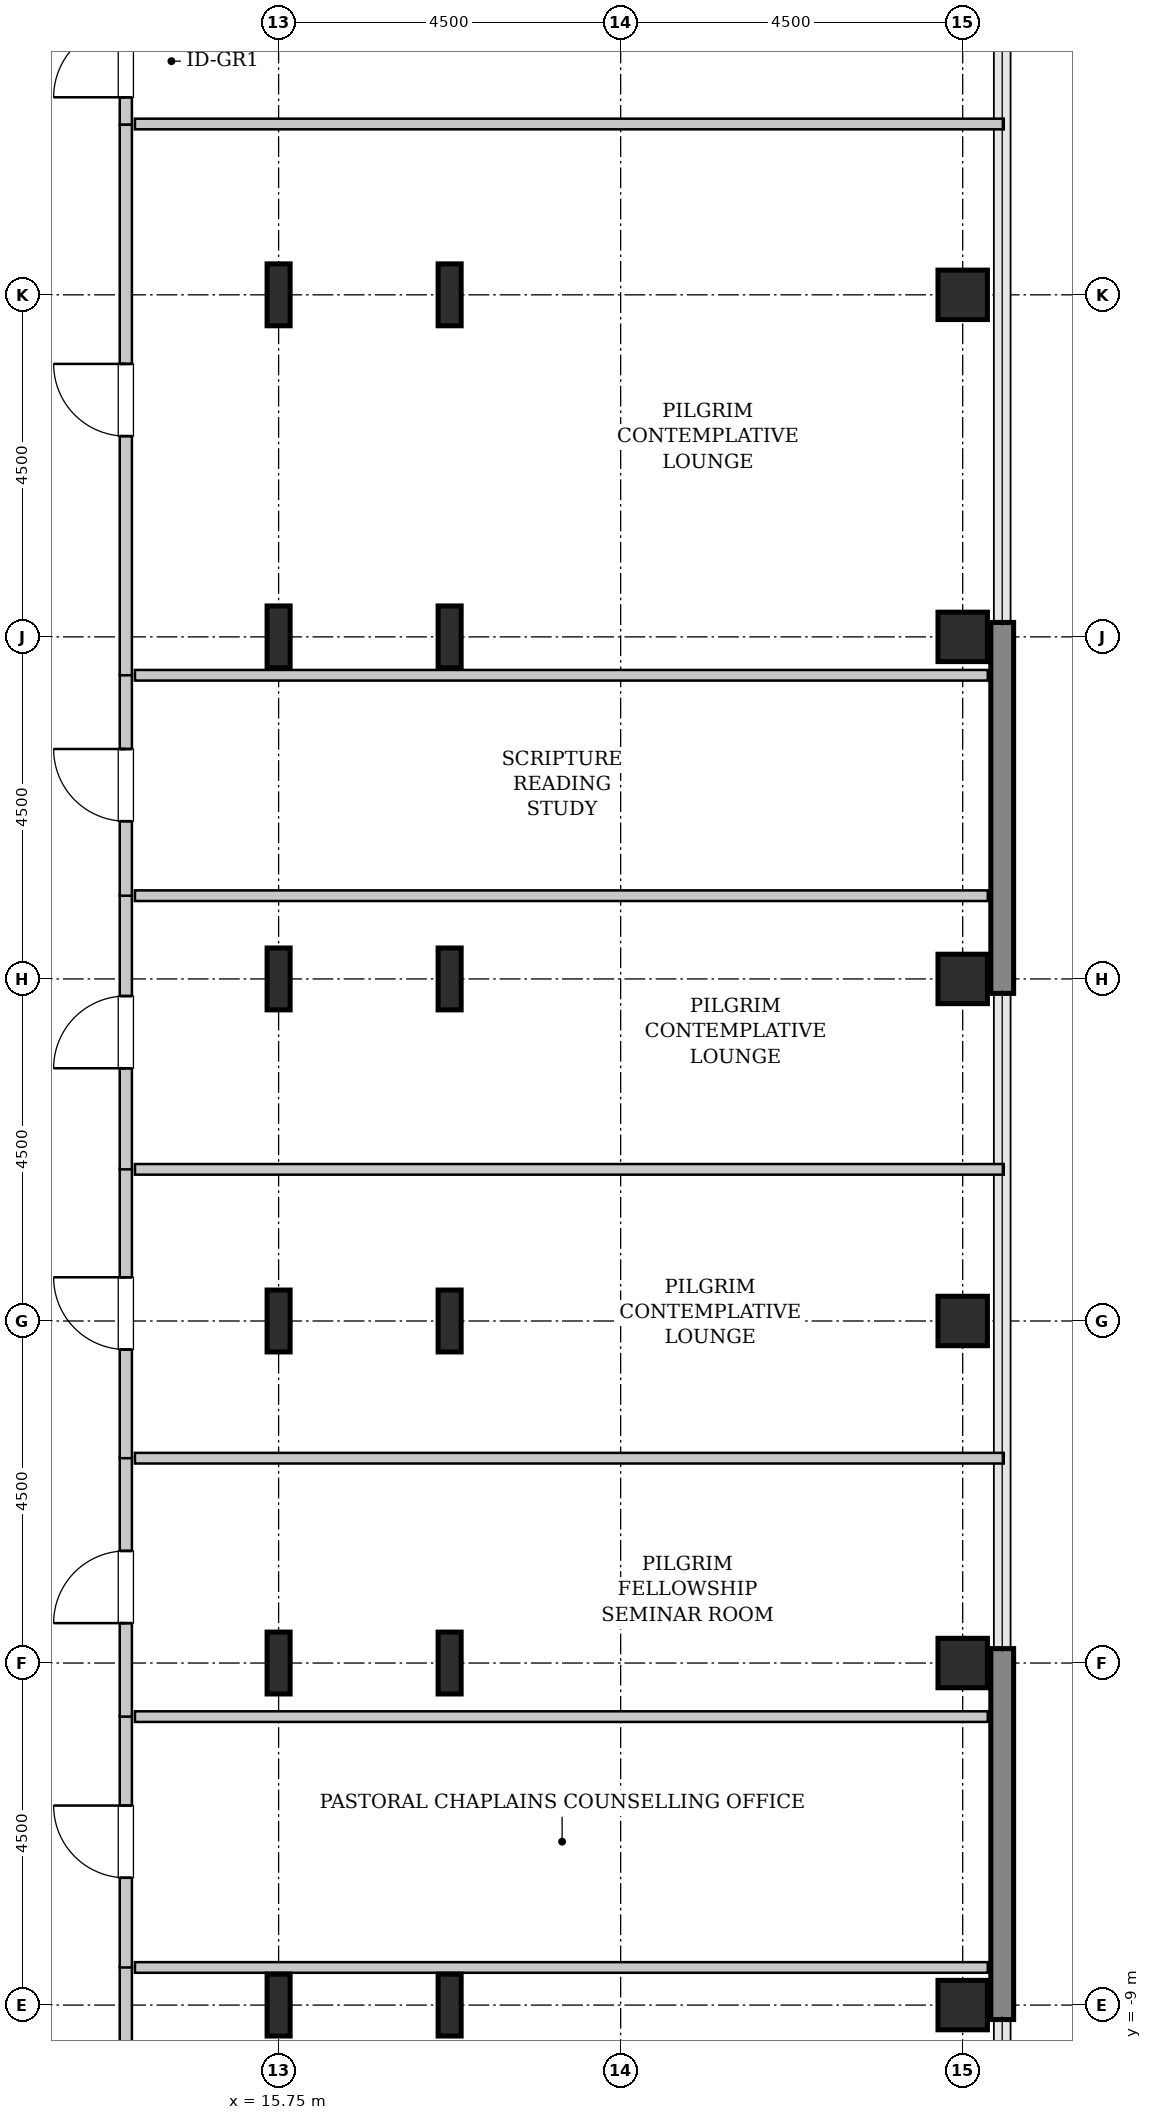
"""IFC4 building model, lengths in metres.
Left out: names, types, materials, properties, quantities, classifications, styles, units other than length and angle.
Written with IfcOpenShell. Run it as: python <this file> out.ifc"""

import sys

from ifc_helpers import new_model, si_unit, direction, frame, frame_2d, origin, origin_2d, place, context, subcontext, project, spatial, rectangle, hollow_rectangle, i_section, extrude, source, transform, mapped, element, fill, save


model = new_model("IFC4")
c1 = context("Model", 3, precision=1e-05, world=origin(), true_north=direction((0.0, 1.0)))
c2 = subcontext(c1, "Body", "Model", "MODEL_VIEW")
j1 = project(units=[si_unit("LENGTHUNIT", "METRE"), si_unit("PLANEANGLEUNIT", "RADIAN")], contexts=[c1])
p1 = place(None, origin())
s1 = spatial("IfcSite", under=j1, at=p1, CompositionType="ELEMENT")
p2 = place(p1, origin())
s2 = spatial("IfcBuilding", under=s1, at=p2, CompositionType="ELEMENT")
p3 = place(p2, frame((0.0, 0.0, 252.2)))
s3 = spatial("IfcBuildingStorey", under=s2, at=p3, CompositionType="ELEMENT", Elevation=252.2)
m1 = source(origin(), c2, "Body", "SweptSolid", [
    extrude(i_section(OverallWidth=0.303, OverallDepth=0.814, WebThickness=0.021, FlangeThickness=0.04, FilletRadius=0.03, at=origin_2d()), origin(), (0.0, 0.0, 1.0), 3.8),
])
for number, where, z_axis, x_axis in (
    (1, (15.75, -9.0, 0.0), (0.0, 0.0, 1.0), (1.0, 0.0, 0.0)),
    (2, (15.75, -4.5, 0.0), (0.0, 0.0, 1.0), (1.0, 0.0, 0.0)),
    (3, (15.75, 0.0, 0.0), (0.0, 0.0, 1.0), (1.0, 0.0, 0.0)),
    (4, (15.75, 4.5, 0.0), (0.0, 0.0, 1.0), (1.0, 0.0, 0.0)),
    (5, (15.75, 9.0, 0.0), (0.0, 0.0, 1.0), (1.0, 0.0, 0.0)),
    (6, (15.75, 13.5, 0.0), (0.0, 0.0, 1.0), (1.0, 0.0, 0.0)),
    (7, (18.0, -9.0, 0.0), (0.0, 0.0, 1.0), (1.0, 0.0, 0.0)),
    (8, (18.0, -4.5, 0.0), (0.0, 0.0, 1.0), (1.0, 0.0, 0.0)),
    (9, (18.0, 0.0, 0.0), (0.0, 0.0, 1.0), (1.0, 0.0, 0.0)),
    (10, (18.0, 4.5, 0.0), (0.0, 0.0, 1.0), (1.0, 0.0, 0.0)),
    (11, (18.0, 9.0, 0.0), (0.0, 0.0, 1.0), (1.0, 0.0, 0.0)),
    (12, (18.0, 13.5, 0.0), (0.0, 0.0, 1.0), (1.0, 0.0, 0.0)),
):
    element("IfcColumn", number, at=place(p3, frame(where, z_axis=z_axis, x_axis=x_axis)), inside=s3, PredefinedType="COLUMN", context=c2, shape_type="MappedRepresentation", body=[
        mapped(m1, transform((0.0, 0.0, 0.0), x_axis=(1.0, 0.0, 0.0), y_axis=(0.0, 1.0, 0.0), z_axis=(0.0, 0.0, 1.0), scale=1.0)),
    ])
m2 = source(origin(), c2, "Body", "SweptSolid", [
    extrude(hollow_rectangle(XDim=0.65, YDim=0.65, WallThickness=0.032, InnerFilletRadius=0.032, OuterFilletRadius=0.064, at=origin_2d()), origin(), (0.0, 0.0, 1.0), 3.8),
])
for number, where, z_axis, x_axis in (
    (13, (24.75, -9.0, 0.0), (0.0, 0.0, 1.0), (1.0, 0.0, 0.0)),
    (14, (24.75, -4.5, 0.0), (0.0, 0.0, 1.0), (1.0, 0.0, 0.0)),
    (15, (24.75, 0.0, 0.0), (0.0, 0.0, 1.0), (1.0, 0.0, 0.0)),
    (16, (24.75, 4.5, 0.0), (0.0, 0.0, 1.0), (1.0, 0.0, 0.0)),
    (17, (24.75, 9.0, 0.0), (0.0, 0.0, 1.0), (1.0, 0.0, 0.0)),
    (18, (24.75, 13.5, 0.0), (0.0, 0.0, 1.0), (1.0, 0.0, 0.0)),
):
    element("IfcColumn", number, at=place(p3, frame(where, z_axis=z_axis, x_axis=x_axis)), inside=s3, PredefinedType="COLUMN", context=c2, shape_type="MappedRepresentation", body=[
        mapped(m2, transform((0.0, 0.0, 0.0), x_axis=(1.0, 0.0, 0.0), y_axis=(0.0, 1.0, 0.0), z_axis=(0.0, 0.0, 1.0), scale=1.0)),
    ])
m3 = source(origin(), c2, "Body", "SweptSolid", [
    extrude(rectangle(XDim=4.88, YDim=0.3, at=frame_2d((2.44, 0.0))), origin(), (0.0, 0.0, 1.0), 3.55),
])
for number, where, z_axis, x_axis in (
    (19, (25.27, -9.19, 0.0), (0.0, 0.0, 1.0), (0.0, 1.0, 0.0)),
    (20, (25.27, 4.31, 0.0), (0.0, 0.0, 1.0), (0.0, 1.0, 0.0)),
):
    element("IfcWall", number, at=place(p3, frame(where, z_axis=z_axis, x_axis=x_axis)), inside=s3, PredefinedType="SHEAR", context=c2, shape_type="MappedRepresentation", body=[
        mapped(m3, transform((0.0, 0.0, 0.0), x_axis=(1.0, 0.0, 0.0), y_axis=(0.0, 1.0, 0.0), z_axis=(0.0, 0.0, 1.0), scale=1.0)),
    ])
m4 = source(origin(), c2, "Body", "SweptSolid", [
    extrude(rectangle(XDim=7.242, YDim=0.16, at=frame_2d((3.621, 0.0))), origin(), (0.0, 0.0, 1.0), 3.535),
])
p4 = place(p3, frame((13.74, -15.738, 0.0), z_axis=(0.0, 0.0, 1.0), x_axis=(0.0, 1.0, 0.0)))
e21 = element("IfcWall", 21, at=p4, inside=s3, PredefinedType="PARTITIONING", context=c2, shape_type="MappedRepresentation", body=[
    mapped(m4, transform((0.0, 0.0, 0.0), x_axis=(1.0, 0.0, 0.0), y_axis=(0.0, 1.0, 0.0), z_axis=(0.0, 0.0, 1.0), scale=1.0)),
])
p5 = place(p4, frame((3.146, 0.0, 0.0)))
e22 = element("IfcOpeningElement", 22, at=p5, cuts=e21, PredefinedType="OPENING", context=c2, shape_type="SweptSolid", body=[
    extrude(rectangle(XDim=0.95, YDim=2.1, at=frame_2d((0.475, 1.05))), frame((0.0, 0.09, 0.0), z_axis=(0.0, -1.0, 0.0), x_axis=(1.0, 0.0, 0.0)), (0.0, 0.0, 1.0), 0.18),
])
m5 = source(origin(), c2, "Body", "SweptSolid", [
    extrude(rectangle(XDim=11.22, YDim=0.14, at=frame_2d((5.61, 0.0))), origin(), (0.0, 0.0, 1.0), 2.925),
])
p6 = place(p3, frame((13.86, -8.505, 0.0), z_axis=(0.0, 0.0, 1.0), x_axis=(1.0, 0.0, 0.0)))
e23 = element("IfcWall", 23, at=p6, inside=s3, PredefinedType="PARTITIONING", context=c2, shape_type="MappedRepresentation", body=[
    mapped(m5, transform((0.0, 0.0, 0.0), x_axis=(1.0, 0.0, 0.0), y_axis=(0.0, 1.0, 0.0), z_axis=(0.0, 0.0, 1.0), scale=1.0)),
])
m6 = source(origin(), c2, "Body", "SweptSolid", [
    extrude(rectangle(XDim=3.31, YDim=0.16, at=frame_2d((1.655, 0.0))), origin(), (0.0, 0.0, 1.0), 3.535),
])
p7 = place(p3, frame((13.74, -8.505, 0.0), z_axis=(0.0, 0.0, 1.0), x_axis=(0.0, 1.0, 0.0)))
e24 = element("IfcWall", 24, at=p7, inside=s3, PredefinedType="PARTITIONING", context=c2, shape_type="MappedRepresentation", body=[
    mapped(m6, transform((0.0, 0.0, 0.0), x_axis=(1.0, 0.0, 0.0), y_axis=(0.0, 1.0, 0.0), z_axis=(0.0, 0.0, 1.0), scale=1.0)),
])
p8 = place(p7, frame((1.18, 0.0, 0.0)))
e25 = element("IfcOpeningElement", 25, at=p8, cuts=e24, PredefinedType="OPENING", context=c2, shape_type="SweptSolid", body=[
    extrude(rectangle(XDim=0.95, YDim=2.1, at=frame_2d((0.475, 1.05))), frame((0.0, 0.09, 0.0), z_axis=(0.0, -1.0, 0.0), x_axis=(1.0, 0.0, 0.0)), (0.0, 0.0, 1.0), 0.18),
])
m7 = source(origin(), c2, "Body", "SweptSolid", [
    extrude(rectangle(XDim=11.22, YDim=0.14, at=frame_2d((5.61, 0.0))), origin(), (0.0, 0.0, 1.0), 3.535),
])
p9 = place(p3, frame((13.86, -5.205, 0.0), z_axis=(0.0, 0.0, 1.0), x_axis=(1.0, 0.0, 0.0)))
e26 = element("IfcWall", 26, at=p9, inside=s3, PredefinedType="PARTITIONING", context=c2, shape_type="MappedRepresentation", body=[
    mapped(m7, transform((0.0, 0.0, 0.0), x_axis=(1.0, 0.0, 0.0), y_axis=(0.0, 1.0, 0.0), z_axis=(0.0, 0.0, 1.0), scale=1.0)),
])
m8 = source(origin(), c2, "Body", "SweptSolid", [
    extrude(rectangle(XDim=3.41, YDim=0.16, at=frame_2d((1.705, 0.0))), origin(), (0.0, 0.0, 1.0), 3.535),
])
p10 = place(p3, frame((13.74, -5.205, 0.0), z_axis=(0.0, 0.0, 1.0), x_axis=(0.0, 1.0, 0.0)))
e27 = element("IfcWall", 27, at=p10, inside=s3, PredefinedType="PARTITIONING", context=c2, shape_type="MappedRepresentation", body=[
    mapped(m8, transform((0.0, 0.0, 0.0), x_axis=(1.0, 0.0, 0.0), y_axis=(0.0, 1.0, 0.0), z_axis=(0.0, 0.0, 1.0), scale=1.0)),
])
p11 = place(p10, frame((1.23, 0.0, 0.0)))
e28 = element("IfcOpeningElement", 28, at=p11, cuts=e27, PredefinedType="OPENING", context=c2, shape_type="SweptSolid", body=[
    extrude(rectangle(XDim=0.95, YDim=2.1, at=frame_2d((0.475, 1.05))), frame((0.0, 0.09, 0.0), z_axis=(0.0, -1.0, 0.0), x_axis=(1.0, 0.0, 0.0)), (0.0, 0.0, 1.0), 0.18),
])
m9 = source(origin(), c2, "Body", "SweptSolid", [
    extrude(rectangle(XDim=11.43, YDim=0.14, at=frame_2d((5.715, 0.0))), origin(), (0.0, 0.0, 1.0), 3.535),
])
p12 = place(p3, frame((13.86, -1.805, 0.0), z_axis=(0.0, 0.0, 1.0), x_axis=(1.0, 0.0, 0.0)))
e29 = element("IfcWall", 29, at=p12, inside=s3, PredefinedType="PARTITIONING", context=c2, shape_type="MappedRepresentation", body=[
    mapped(m9, transform((0.0, 0.0, 0.0), x_axis=(1.0, 0.0, 0.0), y_axis=(0.0, 1.0, 0.0), z_axis=(0.0, 0.0, 1.0), scale=1.0)),
])
m10 = source(origin(), c2, "Body", "SweptSolid", [
    extrude(rectangle(XDim=3.81, YDim=0.16, at=frame_2d((1.905, 0.0))), origin(), (0.0, 0.0, 1.0), 3.535),
])
p13 = place(p3, frame((13.74, -1.805, 0.0), z_axis=(0.0, 0.0, 1.0), x_axis=(0.0, 1.0, 0.0)))
e30 = element("IfcWall", 30, at=p13, inside=s3, PredefinedType="PARTITIONING", context=c2, shape_type="MappedRepresentation", body=[
    mapped(m10, transform((0.0, 0.0, 0.0), x_axis=(1.0, 0.0, 0.0), y_axis=(0.0, 1.0, 0.0), z_axis=(0.0, 0.0, 1.0), scale=1.0)),
])
p14 = place(p13, frame((1.43, 0.0, 0.0)))
e31 = element("IfcOpeningElement", 31, at=p14, cuts=e30, PredefinedType="OPENING", context=c2, shape_type="SweptSolid", body=[
    extrude(rectangle(XDim=0.95, YDim=2.1, at=frame_2d((0.475, 1.05))), frame((0.0, 0.09, 0.0), z_axis=(0.0, -1.0, 0.0), x_axis=(1.0, 0.0, 0.0)), (0.0, 0.0, 1.0), 0.18),
])
p15 = place(p3, frame((13.86, 1.995, 0.0), z_axis=(0.0, 0.0, 1.0), x_axis=(1.0, 0.0, 0.0)))
e32 = element("IfcWall", 32, at=p15, inside=s3, PredefinedType="PARTITIONING", context=c2, shape_type="MappedRepresentation", body=[
    mapped(m9, transform((0.0, 0.0, 0.0), x_axis=(1.0, 0.0, 0.0), y_axis=(0.0, 1.0, 0.0), z_axis=(0.0, 0.0, 1.0), scale=1.0)),
])
m11 = source(origin(), c2, "Body", "SweptSolid", [
    extrude(rectangle(XDim=3.61, YDim=0.16, at=frame_2d((1.805, 0.0))), origin(), (0.0, 0.0, 1.0), 3.535),
])
p16 = place(p3, frame((13.74, 1.995, 0.0), z_axis=(0.0, 0.0, 1.0), x_axis=(0.0, 1.0, 0.0)))
e33 = element("IfcWall", 33, at=p16, inside=s3, PredefinedType="PARTITIONING", context=c2, shape_type="MappedRepresentation", body=[
    mapped(m11, transform((0.0, 0.0, 0.0), x_axis=(1.0, 0.0, 0.0), y_axis=(0.0, 1.0, 0.0), z_axis=(0.0, 0.0, 1.0), scale=1.0)),
])
p17 = place(p16, frame((1.33, 0.0, 0.0)))
e34 = element("IfcOpeningElement", 34, at=p17, cuts=e33, PredefinedType="OPENING", context=c2, shape_type="SweptSolid", body=[
    extrude(rectangle(XDim=0.95, YDim=2.1, at=frame_2d((0.475, 1.05))), frame((0.0, 0.09, 0.0), z_axis=(0.0, -1.0, 0.0), x_axis=(1.0, 0.0, 0.0)), (0.0, 0.0, 1.0), 0.18),
])
p18 = place(p3, frame((13.86, 5.595, 0.0), z_axis=(0.0, 0.0, 1.0), x_axis=(1.0, 0.0, 0.0)))
e35 = element("IfcWall", 35, at=p18, inside=s3, PredefinedType="PARTITIONING", context=c2, shape_type="MappedRepresentation", body=[
    mapped(m7, transform((0.0, 0.0, 0.0), x_axis=(1.0, 0.0, 0.0), y_axis=(0.0, 1.0, 0.0), z_axis=(0.0, 0.0, 1.0), scale=1.0)),
])
m12 = source(origin(), c2, "Body", "SweptSolid", [
    extrude(rectangle(XDim=2.91, YDim=0.16, at=frame_2d((1.455, 0.0))), origin(), (0.0, 0.0, 1.0), 3.535),
])
p19 = place(p3, frame((13.74, 5.595, 0.0), z_axis=(0.0, 0.0, 1.0), x_axis=(0.0, 1.0, 0.0)))
e36 = element("IfcWall", 36, at=p19, inside=s3, PredefinedType="PARTITIONING", context=c2, shape_type="MappedRepresentation", body=[
    mapped(m12, transform((0.0, 0.0, 0.0), x_axis=(1.0, 0.0, 0.0), y_axis=(0.0, 1.0, 0.0), z_axis=(0.0, 0.0, 1.0), scale=1.0)),
])
p20 = place(p19, frame((0.98, 0.0, 0.0)))
e37 = element("IfcOpeningElement", 37, at=p20, cuts=e36, PredefinedType="OPENING", context=c2, shape_type="SweptSolid", body=[
    extrude(rectangle(XDim=0.95, YDim=2.1, at=frame_2d((0.475, 1.05))), frame((0.0, 0.09, 0.0), z_axis=(0.0, -1.0, 0.0), x_axis=(1.0, 0.0, 0.0)), (0.0, 0.0, 1.0), 0.18),
])
p21 = place(p3, frame((13.86, 8.495, 0.0), z_axis=(0.0, 0.0, 1.0), x_axis=(1.0, 0.0, 0.0)))
e38 = element("IfcWall", 38, at=p21, inside=s3, PredefinedType="PARTITIONING", context=c2, shape_type="MappedRepresentation", body=[
    mapped(m5, transform((0.0, 0.0, 0.0), x_axis=(1.0, 0.0, 0.0), y_axis=(0.0, 1.0, 0.0), z_axis=(0.0, 0.0, 1.0), scale=1.0)),
])
m13 = source(origin(), c2, "Body", "SweptSolid", [
    extrude(rectangle(XDim=7.302, YDim=0.16, at=frame_2d((3.651, 0.0))), origin(), (0.0, 0.0, 1.0), 3.535),
])
p22 = place(p3, frame((13.74, 15.738, 0.0), z_axis=(0.0, 0.0, 1.0), x_axis=(0.0, 1.0, 0.0)))
e39 = element("IfcWall", 39, at=p22, inside=s3, PredefinedType="PARTITIONING", context=c2, shape_type="MappedRepresentation", body=[
    mapped(m13, transform((0.0, 0.0, 0.0), x_axis=(1.0, 0.0, 0.0), y_axis=(0.0, 1.0, 0.0), z_axis=(0.0, 0.0, 1.0), scale=1.0)),
])
p23 = place(p22, frame((0.361, 0.0, 0.0)))
e40 = element("IfcOpeningElement", 40, at=p23, cuts=e39, PredefinedType="OPENING", context=c2, shape_type="SweptSolid", body=[
    extrude(rectangle(XDim=0.95, YDim=2.1, at=frame_2d((0.475, 1.05))), frame((0.0, 0.09, 0.0), z_axis=(0.0, -1.0, 0.0), x_axis=(1.0, 0.0, 0.0)), (0.0, 0.0, 1.0), 0.18),
])
p24 = place(p3, frame((13.86, 15.748, 0.0), z_axis=(0.0, 0.0, 1.0), x_axis=(1.0, 0.0, 0.0)))
e41 = element("IfcWall", 41, at=p24, inside=s3, PredefinedType="PARTITIONING", context=c2, shape_type="MappedRepresentation", body=[
    mapped(m9, transform((0.0, 0.0, 0.0), x_axis=(1.0, 0.0, 0.0), y_axis=(0.0, 1.0, 0.0), z_axis=(0.0, 0.0, 1.0), scale=1.0)),
])
p25 = place(p3, frame((13.74, 8.495, 0.0), z_axis=(0.0, 0.0, 1.0), x_axis=(0.0, 1.0, 0.0)))
e42 = element("IfcWall", 42, at=p25, inside=s3, PredefinedType="PARTITIONING", context=c2, shape_type="MappedRepresentation", body=[
    mapped(m4, transform((0.0, 0.0, 0.0), x_axis=(1.0, 0.0, 0.0), y_axis=(0.0, 1.0, 0.0), z_axis=(0.0, 0.0, 1.0), scale=1.0)),
])
p26 = place(p25, frame((3.146, 0.0, 0.0)))
e43 = element("IfcOpeningElement", 43, at=p26, cuts=e42, PredefinedType="OPENING", context=c2, shape_type="SweptSolid", body=[
    extrude(rectangle(XDim=0.95, YDim=2.1, at=frame_2d((0.475, 1.05))), frame((0.0, 0.09, 0.0), z_axis=(0.0, -1.0, 0.0), x_axis=(1.0, 0.0, 0.0)), (0.0, 0.0, 1.0), 0.18),
])
m14 = source(origin(), c2, "Body", "SweptSolid", [
    extrude(rectangle(XDim=0.95, YDim=2.1, at=frame_2d((0.475, 1.05))), frame((0.0, 0.025, 0.0), z_axis=(0.0, -1.0, 0.0), x_axis=(1.0, 0.0, 0.0)), (0.0, 0.0, 1.0), 0.05),
])
p27 = place(p8, origin())
e44 = element("IfcDoor", 44, at=p27, inside=s3, OperationType="SINGLE_SWING_RIGHT", PredefinedType="DOOR", context=c2, shape_type="MappedRepresentation", body=[
    mapped(m14, transform((0.0, 0.0, 0.0), x_axis=(1.0, 0.0, 0.0), y_axis=(0.0, 1.0, 0.0), z_axis=(0.0, 0.0, 1.0), scale=1.0)),
])
fill(e25, e44)
p28 = place(p11, origin())
e45 = element("IfcDoor", 45, at=p28, inside=s3, OperationType="SINGLE_SWING_LEFT", PredefinedType="DOOR", context=c2, shape_type="MappedRepresentation", body=[
    mapped(m14, transform((0.0, 0.0, 0.0), x_axis=(1.0, 0.0, 0.0), y_axis=(0.0, 1.0, 0.0), z_axis=(0.0, 0.0, 1.0), scale=1.0)),
])
fill(e28, e45)
p29 = place(p14, origin())
e46 = element("IfcDoor", 46, at=p29, inside=s3, OperationType="SINGLE_SWING_RIGHT", PredefinedType="DOOR", context=c2, shape_type="MappedRepresentation", body=[
    mapped(m14, transform((0.0, 0.0, 0.0), x_axis=(1.0, 0.0, 0.0), y_axis=(0.0, 1.0, 0.0), z_axis=(0.0, 0.0, 1.0), scale=1.0)),
])
fill(e31, e46)
p30 = place(p17, origin())
e47 = element("IfcDoor", 47, at=p30, inside=s3, OperationType="SINGLE_SWING_LEFT", PredefinedType="DOOR", context=c2, shape_type="MappedRepresentation", body=[
    mapped(m14, transform((0.0, 0.0, 0.0), x_axis=(1.0, 0.0, 0.0), y_axis=(0.0, 1.0, 0.0), z_axis=(0.0, 0.0, 1.0), scale=1.0)),
])
fill(e34, e47)
p31 = place(p20, origin())
e48 = element("IfcDoor", 48, at=p31, inside=s3, OperationType="SINGLE_SWING_RIGHT", PredefinedType="DOOR", context=c2, shape_type="MappedRepresentation", body=[
    mapped(m14, transform((0.0, 0.0, 0.0), x_axis=(1.0, 0.0, 0.0), y_axis=(0.0, 1.0, 0.0), z_axis=(0.0, 0.0, 1.0), scale=1.0)),
])
fill(e37, e48)
p32 = place(p23, origin())
e49 = element("IfcDoor", 49, at=p32, inside=s3, OperationType="SINGLE_SWING_LEFT", PredefinedType="DOOR", context=c2, shape_type="MappedRepresentation", body=[
    mapped(m14, transform((0.0, 0.0, 0.0), x_axis=(1.0, 0.0, 0.0), y_axis=(0.0, 1.0, 0.0), z_axis=(0.0, 0.0, 1.0), scale=1.0)),
])
fill(e40, e49)
p33 = place(p26, origin())
e50 = element("IfcDoor", 50, at=p33, inside=s3, OperationType="SINGLE_SWING_RIGHT", PredefinedType="DOOR", context=c2, shape_type="MappedRepresentation", body=[
    mapped(m14, transform((0.0, 0.0, 0.0), x_axis=(1.0, 0.0, 0.0), y_axis=(0.0, 1.0, 0.0), z_axis=(0.0, 0.0, 1.0), scale=1.0)),
])
fill(e43, e50)
save(model, sys.argv[1])
